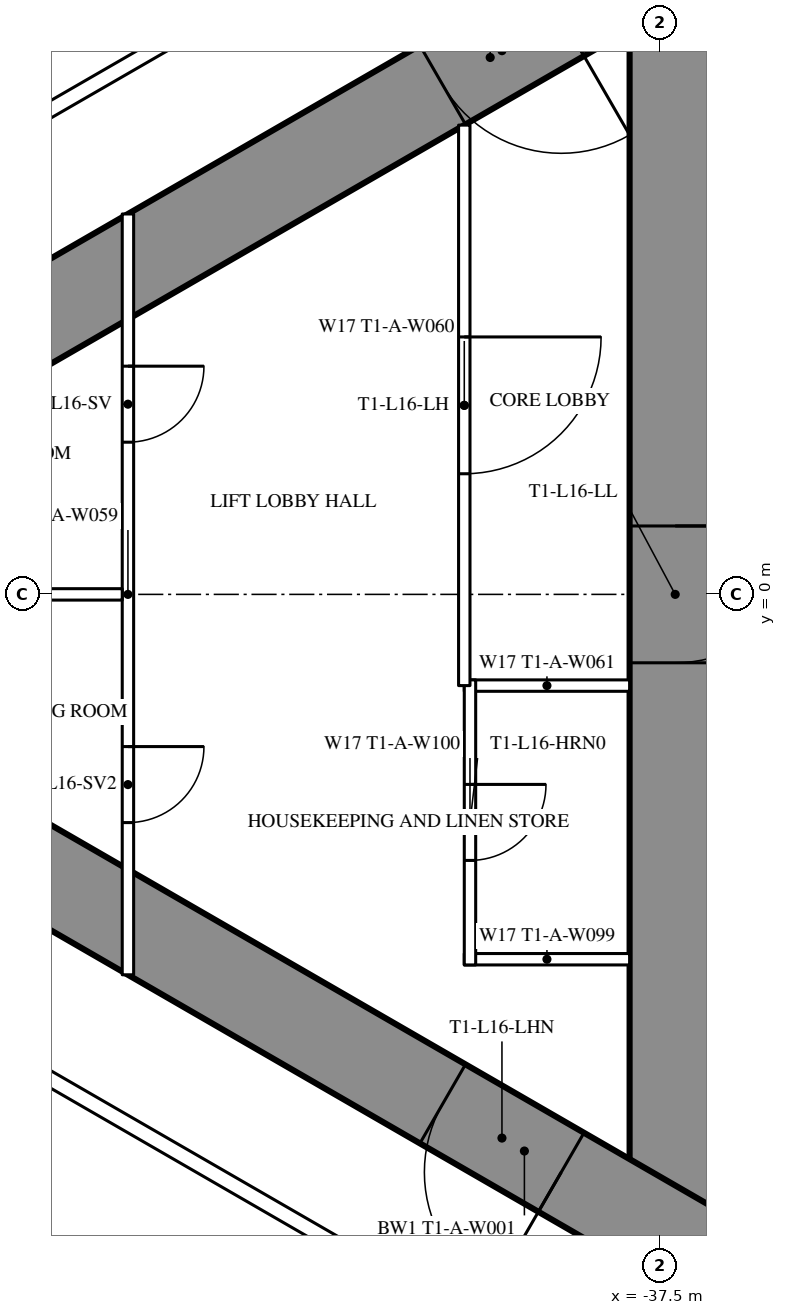
"""IFC4 building model, lengths in metres.
Left out: names, types, materials, properties, quantities, classifications, styles, units other than length and angle.
Written with IfcOpenShell. Run it as: python <this file> out.ifc"""

import sys

from ifc_helpers import new_model, si_unit, direction, frame, frame_2d, origin, place, context, subcontext, project, spatial, rectangle, extrude, element, fill, save


model = new_model("IFC4")
c1 = context("Model", 3, precision=1e-05, world=origin(), true_north=direction((0.0, 1.0)))
c2 = subcontext(c1, "Body", "Model", "MODEL_VIEW")
j1 = project(units=[si_unit("LENGTHUNIT", "METRE"), si_unit("PLANEANGLEUNIT", "RADIAN")], contexts=[c1])
p1 = place(None, origin())
s1 = spatial("IfcSite", under=j1, at=p1, CompositionType="ELEMENT")
p2 = place(p1, origin())
s2 = spatial("IfcBuilding", under=s1, at=p2, CompositionType="ELEMENT")
p3 = place(p2, frame((0.0, 0.0, 63.5)))
s3 = spatial("IfcBuildingStorey", under=s2, at=p3, CompositionType="ELEMENT", Elevation=63.5)
p4 = place(p3, frame((-37.3, 8.6, 0.0), z_axis=(0.0, 0.0, 1.0), x_axis=(0.0, -1.0, 0.0)))
e1 = element("IfcWall", 1, at=p4, inside=s3, PredefinedType="SHEAR", context=c2, shape_type="SweptSolid", body=[
    extrude(rectangle(XDim=17.2, YDim=1.2, at=frame_2d((8.6, 0.0))), origin(), (0.0, 0.0, 1.0), 3.5),
])
p5 = place(p4, frame((7.7, 0.0, 0.0)))
e2 = element("IfcOpeningElement", 2, at=p5, cuts=e1, PredefinedType="OPENING", context=c2, shape_type="SweptSolid", body=[
    extrude(rectangle(XDim=1.8, YDim=2.2, at=frame_2d((0.9, 1.1))), frame((0.0, 0.61, 0.0), z_axis=(0.0, -1.0, 0.0), x_axis=(1.0, 0.0, 0.0)), (0.0, 0.0, 1.0), 1.22),
])
p6 = place(p3, frame((-27.2, 14.3, 0.0), z_axis=(0.0, 0.0, 1.0), x_axis=(-0.866026593062, -0.499997940104, 0.0)))
e3 = element("IfcWall", 3, at=p6, inside=s3, PredefinedType="SHEAR", context=c2, shape_type="SweptSolid", body=[
    extrude(rectangle(XDim=28.946, YDim=1.2, at=frame_2d((14.473, 0.0))), origin(), (0.0, 0.0, 1.0), 3.5),
])
p7 = place(p6, frame((4.6, 0.0, 0.0)))
e4 = element("IfcOpeningElement", 4, at=p7, cuts=e3, PredefinedType="OPENING", context=c2, shape_type="SweptSolid", body=[
    extrude(rectangle(XDim=1.0, YDim=2.2, at=frame_2d((0.5, 1.1))), frame((0.0, 0.61, 0.0), z_axis=(0.0, -1.0, 0.0), x_axis=(1.0, 0.0, 0.0)), (0.0, 0.0, 1.0), 1.22),
])
p8 = place(p6, frame((13.395, 0.0, 0.0)))
e5 = element("IfcOpeningElement", 5, at=p8, cuts=e3, PredefinedType="OPENING", context=c2, shape_type="SweptSolid", body=[
    extrude(rectangle(XDim=1.8, YDim=2.2, at=frame_2d((0.9, 1.1))), frame((0.0, 0.61, 0.0), z_axis=(0.0, -1.0, 0.0), x_axis=(1.0, 0.0, 0.0)), (0.0, 0.0, 1.0), 1.22),
])
p9 = place(p3, frame((-27.2, -14.3, 0.0), z_axis=(0.0, 0.0, 1.0), x_axis=(-0.866024021859, 0.500002393557, 0.0)))
e6 = element("IfcWall", 6, at=p9, inside=s3, PredefinedType="SHEAR", context=c2, shape_type="SweptSolid", body=[
    extrude(rectangle(XDim=27.907, YDim=1.2, at=frame_2d((13.954, 0.0))), origin(), (0.0, 0.0, 1.0), 3.5),
])
p10 = place(p9, frame((4.6, 0.0, 0.0)))
e7 = element("IfcOpeningElement", 7, at=p10, cuts=e6, PredefinedType="OPENING", context=c2, shape_type="SweptSolid", body=[
    extrude(rectangle(XDim=1.0, YDim=2.2, at=frame_2d((0.5, 1.1))), frame((0.0, 0.61, 0.0), z_axis=(0.0, -1.0, 0.0), x_axis=(1.0, 0.0, 0.0)), (0.0, 0.0, 1.0), 1.22),
])
p11 = place(p9, frame((13.395, 0.0, 0.0)))
e8 = element("IfcOpeningElement", 8, at=p11, cuts=e6, PredefinedType="OPENING", context=c2, shape_type="SweptSolid", body=[
    extrude(rectangle(XDim=1.8, YDim=2.2, at=frame_2d((0.9, 1.1))), frame((0.0, 0.61, 0.0), z_axis=(0.0, -1.0, 0.0), x_axis=(1.0, 0.0, 0.0)), (0.0, 0.0, 1.0), 1.22),
])
p12 = place(p3, frame((-37.7, 10.894, 0.0), z_axis=(0.0, 0.0, 1.0), x_axis=(-0.866027905338, -0.499995667157, 0.0)))
e9 = element("IfcWall", 9, at=p12, inside=s3, PredefinedType="PARTITIONING", context=c2, shape_type="SweptSolid", body=[
    extrude(rectangle(XDim=21.787, YDim=0.2, at=frame_2d((10.894, 0.0))), origin(), (0.0, 0.0, 1.0), 3.25),
])
p13 = place(p12, frame((14.13, 0.0, 0.0)))
e10 = element("IfcOpeningElement", 10, at=p13, cuts=e9, PredefinedType="OPENING", context=c2, shape_type="SweptSolid", body=[
    extrude(rectangle(XDim=0.95, YDim=2.2, at=frame_2d((0.475, 1.1))), frame((0.0, 0.11, 0.0), z_axis=(0.0, -1.0, 0.0), x_axis=(1.0, 0.0, 0.0)), (0.0, 0.0, 1.0), 0.22),
])
p14 = place(p12, frame((20.058, 0.0, 0.0)))
e11 = element("IfcOpeningElement", 11, at=p14, cuts=e9, PredefinedType="OPENING", context=c2, shape_type="SweptSolid", body=[
    extrude(rectangle(XDim=0.95, YDim=2.2, at=frame_2d((0.475, 1.1))), frame((0.0, 0.11, 0.0), z_axis=(0.0, -1.0, 0.0), x_axis=(1.0, 0.0, 0.0)), (0.0, 0.0, 1.0), 0.22),
])
p15 = place(p12, frame((0.6, 0.0, 0.0)))
e12 = element("IfcOpeningElement", 12, at=p15, cuts=e9, PredefinedType="OPENING", context=c2, shape_type="SweptSolid", body=[
    extrude(rectangle(XDim=0.95, YDim=2.2, at=frame_2d((0.475, 1.1))), frame((0.0, 0.11, 0.0), z_axis=(0.0, -1.0, 0.0), x_axis=(1.0, 0.0, 0.0)), (0.0, 0.0, 1.0), 0.22),
])
p16 = place(p3, frame((-36.92, -11.344, 0.0), z_axis=(0.0, 0.0, 1.0), x_axis=(-0.866028313256, 0.499994960614, 0.0)))
e13 = element("IfcWall", 13, at=p16, inside=s3, PredefinedType="PARTITIONING", context=c2, shape_type="SweptSolid", body=[
    extrude(rectangle(XDim=22.568, YDim=0.2, at=frame_2d((11.284, 0.0))), origin(), (0.0, 0.0, 1.0), 3.25),
])
p17 = place(p16, frame((18.668, 0.0, 0.0)))
e14 = element("IfcOpeningElement", 14, at=p17, cuts=e13, PredefinedType="OPENING", context=c2, shape_type="SweptSolid", body=[
    extrude(rectangle(XDim=0.95, YDim=2.2, at=frame_2d((0.475, 1.1))), frame((0.0, 0.11, 0.0), z_axis=(0.0, -1.0, 0.0), x_axis=(1.0, 0.0, 0.0)), (0.0, 0.0, 1.0), 0.22),
])
p18 = place(p16, frame((3.35, 0.0, 0.0)))
e15 = element("IfcOpeningElement", 15, at=p18, cuts=e13, PredefinedType="OPENING", context=c2, shape_type="SweptSolid", body=[
    extrude(rectangle(XDim=1.0, YDim=2.2, at=frame_2d((0.5, 1.1))), frame((0.0, 0.11, 0.0), z_axis=(0.0, -1.0, 0.0), x_axis=(1.0, 0.0, 0.0)), (0.0, 0.0, 1.0), 0.22),
])
for number, where, z_axis, x_axis in (
    (16, (-37.9, -1.2, 0.0), (0.0, 0.0, 1.0), (-1.0, 0.0, 0.0)),
    (17, (-37.9, -4.8, 0.0), (0.0, 0.0, 1.0), (-1.0, 0.0, 0.0)),
):
    element("IfcWall", number, at=place(p3, frame(where, z_axis=z_axis, x_axis=x_axis)), inside=s3, PredefinedType="PARTITIONING", context=c2, shape_type="SweptSolid", body=[
        extrude(rectangle(XDim=2.175, YDim=0.15, at=frame_2d((1.087, 0.0))), origin(), (0.0, 0.0, 1.0), 3.25),
    ])
p19 = place(p3, frame((-40.0, -1.125, 0.0), z_axis=(0.0, 0.0, 1.0), x_axis=(0.0, -1.0, 0.0)))
e18 = element("IfcWall", 18, at=p19, inside=s3, PredefinedType="PARTITIONING", context=c2, shape_type="SweptSolid", body=[
    extrude(rectangle(XDim=3.75, YDim=0.15, at=frame_2d((1.875, 0.0))), origin(), (0.0, 0.0, 1.0), 3.25),
])
p20 = place(p19, frame((1.375, 0.0, 0.0)))
e19 = element("IfcOpeningElement", 19, at=p20, cuts=e18, PredefinedType="OPENING", context=c2, shape_type="SweptSolid", body=[
    extrude(rectangle(XDim=1.0, YDim=2.2, at=frame_2d((0.5, 1.1))), frame((0.0, 0.085, 0.0), z_axis=(0.0, -1.0, 0.0), x_axis=(1.0, 0.0, 0.0)), (0.0, 0.0, 1.0), 0.17),
])
p21 = place(p3, frame((-40.075, 6.174, 0.0), z_axis=(0.0, 0.0, 1.0), x_axis=(0.0, -1.0, 0.0)))
e20 = element("IfcWall", 20, at=p21, inside=s3, PredefinedType="PARTITIONING", context=c2, shape_type="SweptSolid", body=[
    extrude(rectangle(XDim=7.374, YDim=0.15, at=frame_2d((3.687, 0.0))), origin(), (0.0, 0.0, 1.0), 3.25),
])
p22 = place(p21, frame((2.787, 0.0, 0.0)))
e21 = element("IfcOpeningElement", 21, at=p22, cuts=e20, PredefinedType="OPENING", context=c2, shape_type="SweptSolid", body=[
    extrude(rectangle(XDim=1.8, YDim=2.2, at=frame_2d((0.9, 1.1))), frame((0.0, 0.085, 0.0), z_axis=(0.0, -1.0, 0.0), x_axis=(1.0, 0.0, 0.0)), (0.0, 0.0, 1.0), 0.17),
])
p23 = place(p3, frame((-44.5, 5.005, 0.0), z_axis=(0.0, 0.0, 1.0), x_axis=(0.0, -1.0, 0.0)))
e22 = element("IfcWall", 22, at=p23, inside=s3, PredefinedType="PARTITIONING", context=c2, shape_type="SweptSolid", body=[
    extrude(rectangle(XDim=10.009, YDim=0.15, at=frame_2d((5.005, 0.0))), origin(), (0.0, 0.0, 1.0), 2.45),
])
p24 = place(p23, frame((2.002, 0.0, 0.0)))
e23 = element("IfcOpeningElement", 23, at=p24, cuts=e22, PredefinedType="OPENING", context=c2, shape_type="SweptSolid", body=[
    extrude(rectangle(XDim=1.0, YDim=2.2, at=frame_2d((0.5, 1.1))), frame((0.0, 0.085, 0.0), z_axis=(0.0, -1.0, 0.0), x_axis=(1.0, 0.0, 0.0)), (0.0, 0.0, 1.0), 0.17),
])
p25 = place(p23, frame((7.007, 0.0, 0.0)))
e24 = element("IfcOpeningElement", 24, at=p25, cuts=e22, PredefinedType="OPENING", context=c2, shape_type="SweptSolid", body=[
    extrude(rectangle(XDim=1.0, YDim=2.2, at=frame_2d((0.5, 1.1))), frame((0.0, 0.085, 0.0), z_axis=(0.0, -1.0, 0.0), x_axis=(1.0, 0.0, 0.0)), (0.0, 0.0, 1.0), 0.17),
])
p26 = place(p3, frame((-44.575, 0.0, 0.0), z_axis=(0.0, 0.0, 1.0), x_axis=(-1.0, 0.0, 0.0)))
e25 = element("IfcWall", 25, at=p26, inside=s3, PredefinedType="PARTITIONING", context=c2, shape_type="SweptSolid", body=[
    extrude(rectangle(XDim=8.593, YDim=0.15, at=frame_2d((4.297, 0.0))), origin(), (0.0, 0.0, 1.0), 2.25),
])
p27 = place(p20, origin())
e26 = element("IfcDoor", 26, at=p27, inside=s3, OperationType="SINGLE_SWING_LEFT", PredefinedType="DOOR", context=c2, shape_type="SweptSolid", body=[
    extrude(rectangle(XDim=1.0, YDim=2.2, at=frame_2d((0.5, 1.1))), frame((0.0, 0.025, 0.0), z_axis=(0.0, -1.0, 0.0), x_axis=(1.0, 0.0, 0.0)), (0.0, 0.0, 1.0), 0.05),
])
fill(e19, e26)
p28 = place(p22, origin())
e27 = element("IfcDoor", 27, at=p28, inside=s3, OperationType="DOUBLE_DOOR_SINGLE_SWING", PredefinedType="DOOR", context=c2, shape_type="SweptSolid", body=[
    extrude(rectangle(XDim=1.8, YDim=2.2, at=frame_2d((0.9, 1.1))), frame((0.0, 0.025, 0.0), z_axis=(0.0, -1.0, 0.0), x_axis=(1.0, 0.0, 0.0)), (0.0, 0.0, 1.0), 0.05),
])
fill(e21, e27)
p29 = place(p24, origin())
e28 = element("IfcDoor", 28, at=p29, inside=s3, OperationType="SINGLE_SWING_LEFT", PredefinedType="DOOR", context=c2, shape_type="SweptSolid", body=[
    extrude(rectangle(XDim=1.0, YDim=2.2, at=frame_2d((0.5, 1.1))), frame((0.0, 0.025, 0.0), z_axis=(0.0, -1.0, 0.0), x_axis=(1.0, 0.0, 0.0)), (0.0, 0.0, 1.0), 0.05),
])
fill(e23, e28)
p30 = place(p25, origin())
e29 = element("IfcDoor", 29, at=p30, inside=s3, OperationType="SINGLE_SWING_LEFT", PredefinedType="DOOR", context=c2, shape_type="SweptSolid", body=[
    extrude(rectangle(XDim=1.0, YDim=2.2, at=frame_2d((0.5, 1.1))), frame((0.0, 0.025, 0.0), z_axis=(0.0, -1.0, 0.0), x_axis=(1.0, 0.0, 0.0)), (0.0, 0.0, 1.0), 0.05),
])
fill(e24, e29)
p31 = place(p8, origin())
e30 = element("IfcDoor", 30, at=p31, inside=s3, OperationType="DOUBLE_DOOR_SINGLE_SWING", PredefinedType="DOOR", context=c2, shape_type="SweptSolid", body=[
    extrude(rectangle(XDim=1.8, YDim=2.2, at=frame_2d((0.9, 1.1))), frame((0.0, 0.025, 0.0), z_axis=(0.0, -1.0, 0.0), x_axis=(1.0, 0.0, 0.0)), (0.0, 0.0, 1.0), 0.05),
])
fill(e5, e30)
p32 = place(p11, origin())
e31 = element("IfcDoor", 31, at=p32, inside=s3, OperationType="DOUBLE_DOOR_SINGLE_SWING", PredefinedType="DOOR", context=c2, shape_type="SweptSolid", body=[
    extrude(rectangle(XDim=1.8, YDim=2.2, at=frame_2d((0.9, 1.1))), frame((0.0, 0.025, 0.0), z_axis=(0.0, -1.0, 0.0), x_axis=(1.0, 0.0, 0.0)), (0.0, 0.0, 1.0), 0.05),
])
fill(e8, e31)
p33 = place(p5, origin())
e32 = element("IfcDoor", 32, at=p33, inside=s3, OperationType="DOUBLE_DOOR_SINGLE_SWING", PredefinedType="DOOR", context=c2, shape_type="SweptSolid", body=[
    extrude(rectangle(XDim=1.8, YDim=2.2, at=frame_2d((0.9, 1.1))), frame((0.0, 0.025, 0.0), z_axis=(0.0, -1.0, 0.0), x_axis=(1.0, 0.0, 0.0)), (0.0, 0.0, 1.0), 0.05),
])
fill(e2, e32)
save(model, sys.argv[1])
